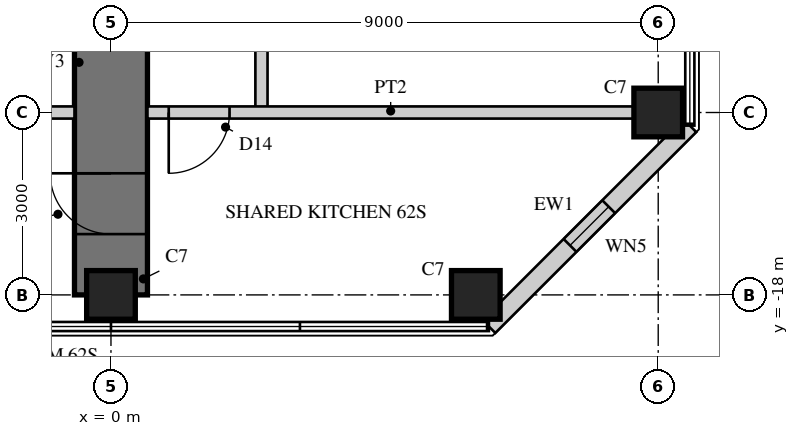
"""IFC4 building model, lengths in metres.
Left out: names, types, materials, properties, quantities, classifications, styles, units other than length and angle.
Written with IfcOpenShell. Run it as: python <this file> out.ifc"""

import sys

from ifc_helpers import new_model, si_unit, direction, frame, frame_2d, origin, origin_2d, place, context, subcontext, project, spatial, rectangle, hollow_rectangle, extrude, element, fill, save


model = new_model("IFC4")
c1 = context("Model", 3, precision=1e-05, world=origin(), true_north=direction((0.0, 1.0)))
c2 = subcontext(c1, "Body", "Model", "MODEL_VIEW")
j1 = project(units=[si_unit("LENGTHUNIT", "METRE"), si_unit("PLANEANGLEUNIT", "RADIAN")], contexts=[c1])
p1 = place(None, origin())
s1 = spatial("IfcSite", under=j1, at=p1, CompositionType="ELEMENT")
p2 = place(p1, origin())
s2 = spatial("IfcBuilding", under=s1, at=p2, CompositionType="ELEMENT")
p3 = place(p2, frame((0.0, 0.0, 242.5)))
s3 = spatial("IfcBuildingStorey", under=s2, at=p3, CompositionType="ELEMENT", Elevation=242.5)
p4 = place(p3, frame((0.0, -9.0, 0.0), z_axis=(0.0, 0.0, 1.0), x_axis=(0.0, -1.0, 0.0)))
e1 = element("IfcWall", 1, at=p4, inside=s3, PredefinedType="SHEAR", context=c2, shape_type="SweptSolid", body=[
    extrude(rectangle(XDim=9.0, YDim=1.2, at=frame_2d((4.5, 0.0))), origin(), (0.0, 0.0, 1.0), 3.4),
])
p5 = place(p4, frame((3.8, 0.0, 0.0)))
e2 = element("IfcOpeningElement", 2, at=p5, cuts=e1, PredefinedType="OPENING", context=c2, shape_type="SweptSolid", body=[
    extrude(rectangle(XDim=1.0, YDim=2.15, at=frame_2d((0.5, 1.075))), frame((0.0, 0.61, 0.0), z_axis=(0.0, -1.0, 0.0), x_axis=(1.0, 0.0, 0.0)), (0.0, 0.0, 1.0), 1.22),
])
p6 = place(p4, frame((7.0, 0.0, 0.0)))
e3 = element("IfcOpeningElement", 3, at=p6, cuts=e1, PredefinedType="OPENING", context=c2, shape_type="SweptSolid", body=[
    extrude(rectangle(XDim=1.0, YDim=2.2, at=frame_2d((0.5, 1.1))), frame((0.0, 0.61, 0.0), z_axis=(0.0, -1.0, 0.0), x_axis=(1.0, 0.0, 0.0)), (0.0, 0.0, 1.0), 1.22),
])
for number, where, z_axis, x_axis in (
    (4, (9.0, -15.0, 0.0), (0.0, 0.0, 1.0), (1.0, 0.0, 0.0)),
    (5, (0.0, -18.0, 0.0), (0.0, 0.0, 1.0), (1.0, 0.0, 0.0)),
    (6, (6.0, -18.0, 0.0), (0.0, 0.0, 1.0), (1.0, 0.0, 0.0)),
):
    element("IfcColumn", number, at=place(p3, frame(where, z_axis=z_axis, x_axis=x_axis)), inside=s3, PredefinedType="COLUMN", context=c2, shape_type="SweptSolid", body=[
        extrude(rectangle(XDim=0.8, YDim=0.8, at=origin_2d()), origin(), (0.0, 0.0, 1.0), 3.4),
    ])
p7 = place(p3, frame((6.215, -18.52, 0.0), z_axis=(0.0, 0.0, 1.0), x_axis=(0.707106781187, 0.707106781187, 0.0)))
e7 = element("IfcWall", 7, at=p7, inside=s3, PredefinedType="SOLIDWALL", context=c2, shape_type="SweptSolid", body=[
    extrude(rectangle(XDim=4.674, YDim=0.3, at=frame_2d((2.337, 0.0))), origin(), (0.0, 0.0, 1.0), 3.22),
])
p8 = place(p7, frame((1.887, 0.0, 0.3)))
e8 = element("IfcOpeningElement", 8, at=p8, cuts=e7, PredefinedType="OPENING", context=c2, shape_type="SweptSolid", body=[
    extrude(rectangle(XDim=0.9, YDim=2.4, at=frame_2d((0.45, 1.2))), frame((0.0, 0.16, 0.0), z_axis=(0.0, -1.0, 0.0), x_axis=(1.0, 0.0, 0.0)), (0.0, 0.0, 1.0), 0.32),
])
p9 = place(p3, frame((2.475, -9.4, 0.0), z_axis=(0.0, 0.0, 1.0), x_axis=(0.0, -1.0, 0.0)))
e9 = element("IfcWall", 9, at=p9, inside=s3, PredefinedType="SOLIDWALL", context=c2, shape_type="SweptSolid", body=[
    extrude(rectangle(XDim=5.6, YDim=0.2, at=frame_2d((2.8, 0.0))), origin(), (0.0, 0.0, 1.0), 3.22),
])
p10 = place(p9, frame((1.2, 0.0, 0.0)))
e10 = element("IfcOpeningElement", 10, at=p10, cuts=e9, PredefinedType="OPENING", context=c2, shape_type="SweptSolid", body=[
    extrude(rectangle(XDim=1.0, YDim=2.2, at=frame_2d((0.5, 1.1))), frame((0.0, 0.11, 0.0), z_axis=(0.0, -1.0, 0.0), x_axis=(1.0, 0.0, 0.0)), (0.0, 0.0, 1.0), 0.22),
])
p11 = place(p3, frame((-8.6, -15.0, 0.0), z_axis=(0.0, 0.0, 1.0), x_axis=(1.0, 0.0, 0.0)))
e11 = element("IfcWall", 11, at=p11, inside=s3, PredefinedType="SOLIDWALL", context=c2, shape_type="SweptSolid", body=[
    extrude(rectangle(XDim=8.0, YDim=0.2, at=frame_2d((4.0, 0.0))), origin(), (0.0, 0.0, 1.0), 2.52),
])
p12 = place(p3, frame((0.6, -15.0, 0.0), z_axis=(0.0, 0.0, 1.0), x_axis=(1.0, 0.0, 0.0)))
e12 = element("IfcWall", 12, at=p12, inside=s3, PredefinedType="SOLIDWALL", context=c2, shape_type="SweptSolid", body=[
    extrude(rectangle(XDim=8.0, YDim=0.2, at=frame_2d((4.0, 0.0))), origin(), (0.0, 0.0, 1.0), 2.52),
])
p13 = place(p12, frame((0.35, 0.0, 0.0)))
e13 = element("IfcOpeningElement", 13, at=p13, cuts=e12, PredefinedType="OPENING", context=c2, shape_type="SweptSolid", body=[
    extrude(rectangle(XDim=1.0, YDim=2.2, at=frame_2d((0.5, 1.1))), frame((0.0, 0.11, 0.0), z_axis=(0.0, -1.0, 0.0), x_axis=(1.0, 0.0, 0.0)), (0.0, 0.0, 1.0), 0.22),
])
p14 = place(p8, origin())
e14 = element("IfcWindow", 14, at=p14, inside=s3, PartitioningType="SINGLE_PANEL", PredefinedType="WINDOW", context=c2, shape_type="SweptSolid", body=[
    extrude(hollow_rectangle(XDim=0.9, YDim=2.4, WallThickness=0.06, at=frame_2d((0.45, 1.2))), frame((0.0, 0.03, 0.0), z_axis=(0.0, -1.0, 0.0), x_axis=(1.0, 0.0, 0.0)), (0.0, 0.0, 1.0), 0.06),
    extrude(rectangle(XDim=0.779, YDim=2.279, at=frame_2d((0.45, 1.2))), frame((0.0, 0.03, 0.0), z_axis=(0.0, -1.0, 0.0), x_axis=(1.0, 0.0, 0.0)), (0.0, 0.0, 1.0), 0.06),
])
fill(e8, e14)
p15 = place(p13, frame((1.0, 0.0, 0.0), z_axis=(0.0, 0.0, 1.0), x_axis=(-1.0, 0.0, 0.0)))
e15 = element("IfcDoor", 15, at=p15, inside=s3, OperationType="SINGLE_SWING_RIGHT", PredefinedType="DOOR", context=c2, shape_type="SweptSolid", body=[
    extrude(rectangle(XDim=1.0, YDim=2.2, at=frame_2d((0.5, 1.1))), frame((0.0, 0.025, 0.0), z_axis=(0.0, -1.0, 0.0), x_axis=(1.0, 0.0, 0.0)), (0.0, 0.0, 1.0), 0.05),
])
fill(e13, e15)
p16 = place(p6, frame((1.0, 0.0, 0.0), z_axis=(0.0, 0.0, 1.0), x_axis=(-1.0, 0.0, 0.0)))
e16 = element("IfcDoor", 16, at=p16, inside=s3, OperationType="SINGLE_SWING_RIGHT", PredefinedType="DOOR", context=c2, shape_type="SweptSolid", body=[
    extrude(rectangle(XDim=1.0, YDim=2.2, at=frame_2d((0.5, 1.1))), frame((0.0, 0.025, 0.0), z_axis=(0.0, -1.0, 0.0), x_axis=(1.0, 0.0, 0.0)), (0.0, 0.0, 1.0), 0.05),
])
fill(e3, e16)
save(model, sys.argv[1])
